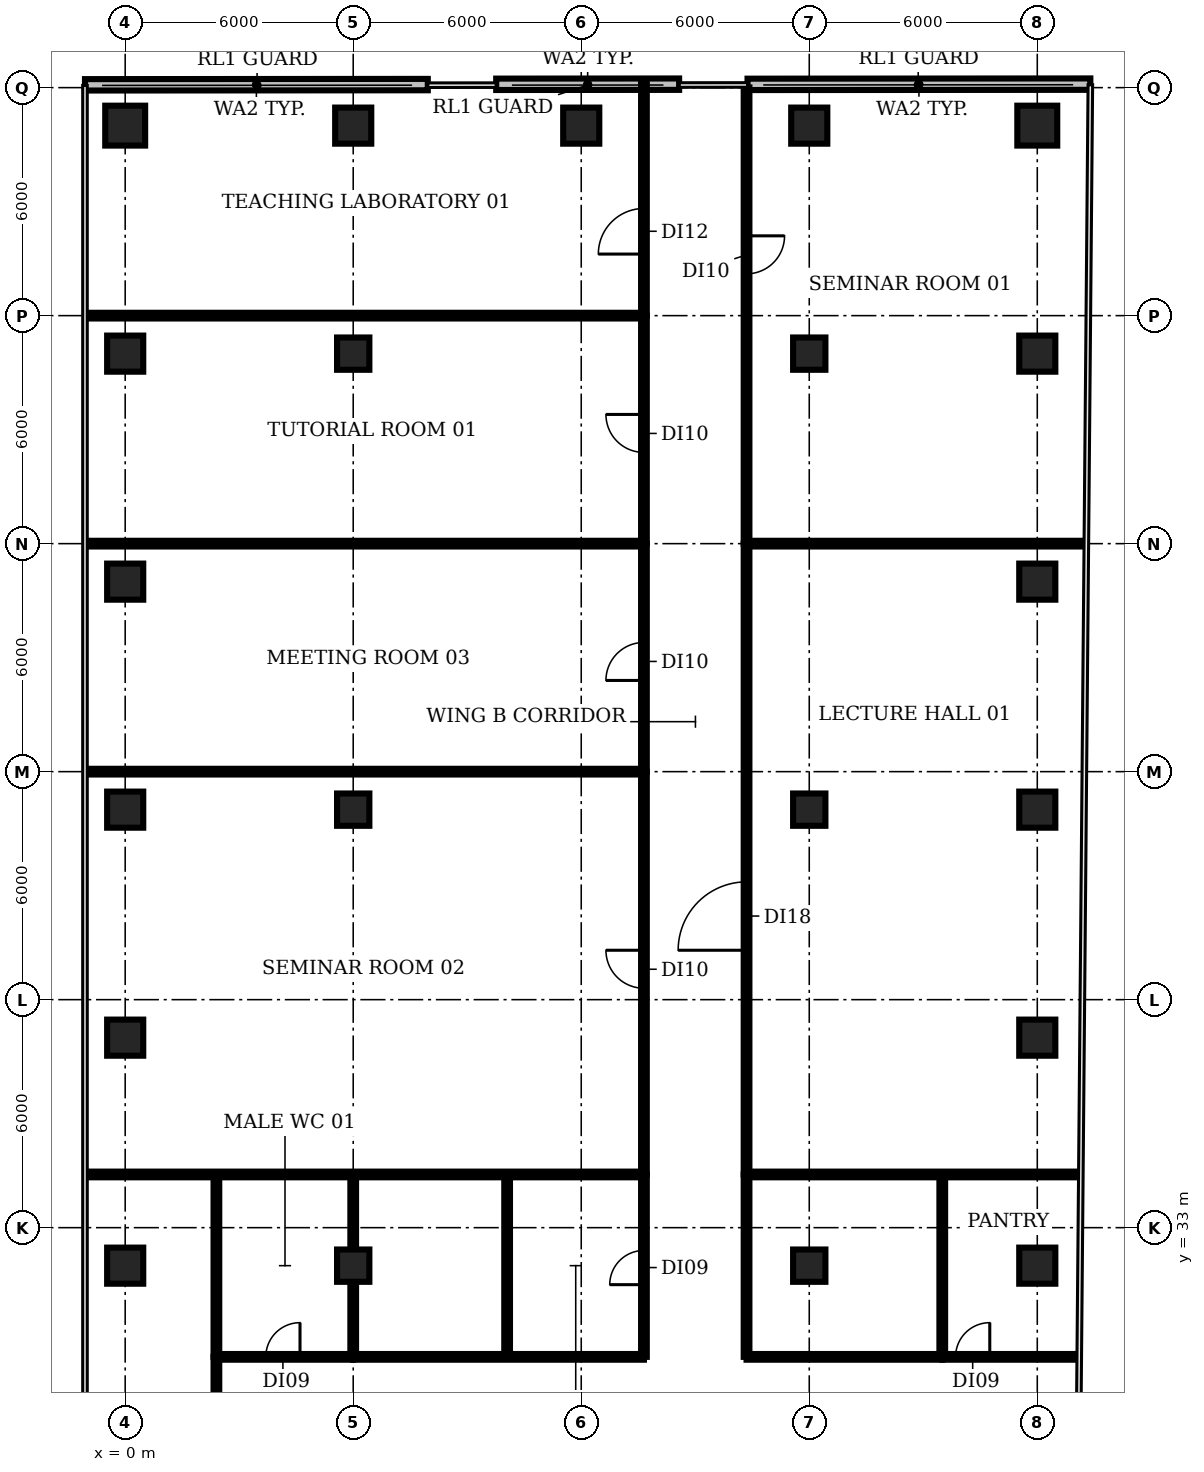
"""IFC4 building model, lengths in metres.
Left out: names, types, materials, properties, quantities, classifications, styles, units other than length and angle.
Written with IfcOpenShell. Run it as: python <this file> out.ifc"""

import sys

from ifc_helpers import new_model, si_unit, direction, frame, frame_2d, origin, origin_2d, place, context, subcontext, project, spatial, rectangle, circle, extrude, element, fill, save


model = new_model("IFC4")
c1 = context("Model", 3, precision=1e-05, world=origin(), true_north=direction((0.0, 1.0)))
c2 = subcontext(c1, "Body", "Model", "MODEL_VIEW")
j1 = project(units=[si_unit("LENGTHUNIT", "METRE"), si_unit("PLANEANGLEUNIT", "RADIAN")], contexts=[c1])
p1 = place(None, origin())
s1 = spatial("IfcSite", under=j1, at=p1, CompositionType="ELEMENT")
p2 = place(p1, origin())
s2 = spatial("IfcBuilding", under=s1, at=p2, CompositionType="ELEMENT")
p3 = place(p2, frame((0.0, 0.0, 50.0)))
s3 = spatial("IfcBuildingStorey", under=s2, at=p3, CompositionType="ELEMENT", Elevation=50.0)
for number, where, z_axis, x_axis in (
    (1, (0.0, 32.0, 0.0), (0.0, 0.0, 1.0), (1.0, 0.0, 0.0)),
    (2, (0.0, 38.0, 0.0), (0.0, 0.0, 1.0), (1.0, 0.0, 0.0)),
    (3, (0.0, 44.0, 0.0), (0.0, 0.0, 1.0), (1.0, 0.0, 0.0)),
    (4, (0.0, 50.0, 0.0), (0.0, 0.0, 1.0), (1.0, 0.0, 0.0)),
    (5, (0.0, 56.0, 0.0), (0.0, 0.0, 1.0), (1.0, 0.0, 0.0)),
):
    element("IfcColumn", number, at=place(p3, frame(where, z_axis=z_axis, x_axis=x_axis)), inside=s3, PredefinedType="COLUMN", context=c2, shape_type="SweptSolid", body=[
        extrude(rectangle(XDim=0.95, YDim=0.95, at=origin_2d()), origin(), (0.0, 0.0, 1.0), 3.85),
    ])
p4 = place(p3, frame((0.0, 62.0, 0.0), z_axis=(0.0, 0.0, 1.0), x_axis=(1.0, 0.0, 0.0)))
e6 = element("IfcColumn", 6, at=p4, inside=s3, PredefinedType="COLUMN", context=c2, shape_type="SweptSolid", body=[
    extrude(circle(Radius=0.525, at=origin_2d()), origin(), (0.0, 0.0, 1.0), 3.85),
])
for number, where, z_axis, x_axis in (
    (7, (6.0, 32.0, 0.0), (0.0, 0.0, 1.0), (1.0, 0.0, 0.0)),
    (8, (6.0, 44.0, 0.0), (0.0, 0.0, 1.0), (1.0, 0.0, 0.0)),
    (9, (6.0, 56.0, 0.0), (0.0, 0.0, 1.0), (1.0, 0.0, 0.0)),
):
    element("IfcColumn", number, at=place(p3, frame(where, z_axis=z_axis, x_axis=x_axis)), inside=s3, PredefinedType="COLUMN", context=c2, shape_type="SweptSolid", body=[
        extrude(rectangle(XDim=0.85, YDim=0.85, at=origin_2d()), origin(), (0.0, 0.0, 1.0), 3.85),
    ])
for number, where, z_axis, x_axis in (
    (10, (6.0, 62.0, 0.0), (0.0, 0.0, 1.0), (1.0, 0.0, 0.0)),
    (11, (12.0, 62.0, 0.0), (0.0, 0.0, 1.0), (1.0, 0.0, 0.0)),
):
    element("IfcColumn", number, at=place(p3, frame(where, z_axis=z_axis, x_axis=x_axis)), inside=s3, PredefinedType="COLUMN", context=c2, shape_type="SweptSolid", body=[
        extrude(rectangle(XDim=0.95, YDim=0.95, at=origin_2d()), origin(), (0.0, 0.0, 1.0), 3.85),
    ])
for number, where, z_axis, x_axis in (
    (12, (18.0, 32.0, 0.0), (0.0, 0.0, 1.0), (1.0, 0.0, 0.0)),
    (13, (18.0, 44.0, 0.0), (0.0, 0.0, 1.0), (1.0, 0.0, 0.0)),
    (14, (18.0, 56.0, 0.0), (0.0, 0.0, 1.0), (1.0, 0.0, 0.0)),
):
    element("IfcColumn", number, at=place(p3, frame(where, z_axis=z_axis, x_axis=x_axis)), inside=s3, PredefinedType="COLUMN", context=c2, shape_type="SweptSolid", body=[
        extrude(rectangle(XDim=0.85, YDim=0.85, at=origin_2d()), origin(), (0.0, 0.0, 1.0), 3.85),
    ])
for number, where, z_axis, x_axis in (
    (15, (18.0, 62.0, 0.0), (0.0, 0.0, 1.0), (1.0, 0.0, 0.0)),
    (16, (24.0, 32.0, 0.0), (0.0, 0.0, 1.0), (1.0, 0.0, 0.0)),
    (17, (24.0, 38.0, 0.0), (0.0, 0.0, 1.0), (1.0, 0.0, 0.0)),
    (18, (24.0, 44.0, 0.0), (0.0, 0.0, 1.0), (1.0, 0.0, 0.0)),
    (19, (24.0, 50.0, 0.0), (0.0, 0.0, 1.0), (1.0, 0.0, 0.0)),
    (20, (24.0, 56.0, 0.0), (0.0, 0.0, 1.0), (1.0, 0.0, 0.0)),
):
    element("IfcColumn", number, at=place(p3, frame(where, z_axis=z_axis, x_axis=x_axis)), inside=s3, PredefinedType="COLUMN", context=c2, shape_type="SweptSolid", body=[
        extrude(rectangle(XDim=0.95, YDim=0.95, at=origin_2d()), origin(), (0.0, 0.0, 1.0), 3.85),
    ])
p5 = place(p3, frame((24.0, 62.0, 0.0), z_axis=(0.0, 0.0, 1.0), x_axis=(1.0, 0.0, 0.0)))
e21 = element("IfcColumn", 21, at=p5, inside=s3, PredefinedType="COLUMN", context=c2, shape_type="SweptSolid", body=[
    extrude(circle(Radius=0.525, at=origin_2d()), origin(), (0.0, 0.0, 1.0), 3.85),
])
p6 = place(p3, frame((25.396, 63.092, 0.0), z_axis=(0.0, 0.0, 1.0), x_axis=(-0.999999752409, -0.000703691501, 0.0)))
e22 = element("IfcWall", 22, at=p6, inside=s3, PredefinedType="SOLIDWALL", context=c2, shape_type="SweptSolid", body=[
    extrude(rectangle(XDim=9.021, YDim=0.3, at=frame_2d((4.51, 0.0))), origin(), (0.0, 0.0, 1.0), 3.85),
])
p7 = place(p3, frame((14.576, 63.091, 0.0), z_axis=(0.0, 0.0, 1.0), x_axis=(-0.999999747891, -0.000710083002, 0.0)))
e23 = element("IfcWall", 23, at=p7, inside=s3, PredefinedType="SOLIDWALL", context=c2, shape_type="SweptSolid", body=[
    extrude(rectangle(XDim=4.813, YDim=0.3, at=frame_2d((2.407, 0.0))), origin(), (0.0, 0.0, 1.0), 3.85),
])
p8 = place(p3, frame((7.962, 63.08, 0.0), z_axis=(0.0, 0.0, 1.0), x_axis=(-0.999999752409, -0.000703691501, 0.0)))
e24 = element("IfcWall", 24, at=p8, inside=s3, PredefinedType="SOLIDWALL", context=c2, shape_type="SweptSolid", body=[
    extrude(rectangle(XDim=9.021, YDim=0.3, at=frame_2d((4.51, 0.0))), origin(), (0.0, 0.0, 1.0), 3.85),
])
for number, where, z_axis, x_axis in (
    (25, (-1.01, 34.4, 0.0), (0.0, 0.0, 1.0), (1.0, 0.0, 0.0)),
    (26, (-1.01, 45.0, 0.0), (0.0, 0.0, 1.0), (1.0, 0.0, 0.0)),
    (27, (-1.01, 51.0, 0.0), (0.0, 0.0, 1.0), (1.0, 0.0, 0.0)),
    (28, (-1.01, 57.0, 0.0), (0.0, 0.0, 1.0), (1.0, 0.0, 0.0)),
):
    element("IfcWall", number, at=place(p3, frame(where, z_axis=z_axis, x_axis=x_axis)), inside=s3, PredefinedType="PARTITIONING", context=c2, shape_type="SweptSolid", body=[
        extrude(rectangle(XDim=14.66, YDim=0.15, at=frame_2d((7.33, 0.0))), origin(), (0.0, 0.0, 1.0), 2.83),
    ])
p9 = place(p3, frame((2.4, 25.7, 0.0), z_axis=(0.0, 0.0, 1.0), x_axis=(0.0, 1.0, 0.0)))
e29 = element("IfcWall", 29, at=p9, inside=s3, PredefinedType="PARTITIONING", context=c2, shape_type="SweptSolid", body=[
    extrude(rectangle(XDim=3.9, YDim=0.15, at=frame_2d((1.95, 0.0))), origin(), (0.0, 0.0, 1.0), 2.83),
])
p10 = place(p3, frame((2.4, 29.6, 0.0), z_axis=(0.0, 0.0, 1.0), x_axis=(0.0, 1.0, 0.0)))
e30 = element("IfcWall", 30, at=p10, inside=s3, PredefinedType="PARTITIONING", context=c2, shape_type="SweptSolid", body=[
    extrude(rectangle(XDim=4.8, YDim=0.15, at=frame_2d((2.4, 0.0))), origin(), (0.0, 0.0, 1.0), 2.83),
])
p11 = place(p3, frame((2.4, 29.6, 0.0), z_axis=(0.0, 0.0, 1.0), x_axis=(1.0, 0.0, 0.0)))
e31 = element("IfcWall", 31, at=p11, inside=s3, PredefinedType="PARTITIONING", context=c2, shape_type="SweptSolid", body=[
    extrude(rectangle(XDim=3.6, YDim=0.15, at=frame_2d((1.8, 0.0))), origin(), (0.0, 0.0, 1.0), 2.83),
])
p12 = place(p11, frame((1.3, 0.0, 0.0)))
e32 = element("IfcOpeningElement", 32, at=p12, cuts=e31, PredefinedType="OPENING", context=c2, shape_type="SweptSolid", body=[
    extrude(rectangle(XDim=0.9, YDim=2.1, at=frame_2d((0.45, 1.05))), frame((0.0, 0.085, 0.0), z_axis=(0.0, -1.0, 0.0), x_axis=(1.0, 0.0, 0.0)), (0.0, 0.0, 1.0), 0.17),
])
p13 = place(p3, frame((6.0, 29.6, 0.0), z_axis=(0.0, 0.0, 1.0), x_axis=(0.0, 1.0, 0.0)))
e33 = element("IfcWall", 33, at=p13, inside=s3, PredefinedType="PARTITIONING", context=c2, shape_type="SweptSolid", body=[
    extrude(rectangle(XDim=4.8, YDim=0.15, at=frame_2d((2.4, 0.0))), origin(), (0.0, 0.0, 1.0), 2.83),
])
p14 = place(p3, frame((6.0, 29.6, 0.0), z_axis=(0.0, 0.0, 1.0), x_axis=(1.0, 0.0, 0.0)))
e34 = element("IfcWall", 34, at=p14, inside=s3, PredefinedType="PARTITIONING", context=c2, shape_type="SweptSolid", body=[
    extrude(rectangle(XDim=7.65, YDim=0.15, at=frame_2d((3.825, 0.0))), origin(), (0.0, 0.0, 1.0), 2.83),
])
p15 = place(p3, frame((10.05, 29.6, 0.0), z_axis=(0.0, 0.0, 1.0), x_axis=(0.0, 1.0, 0.0)))
e35 = element("IfcWall", 35, at=p15, inside=s3, PredefinedType="PARTITIONING", context=c2, shape_type="SweptSolid", body=[
    extrude(rectangle(XDim=4.8, YDim=0.15, at=frame_2d((2.4, 0.0))), origin(), (0.0, 0.0, 1.0), 2.83),
])
p16 = place(p3, frame((13.65, 29.6, 0.0), z_axis=(0.0, 0.0, 1.0), x_axis=(0.0, 1.0, 0.0)))
e36 = element("IfcWall", 36, at=p16, inside=s3, PredefinedType="PARTITIONING", context=c2, shape_type="SweptSolid", body=[
    extrude(rectangle(XDim=4.8, YDim=0.15, at=frame_2d((2.4, 0.0))), origin(), (0.0, 0.0, 1.0), 2.83),
])
p17 = place(p16, frame((1.9, 0.0, 0.0)))
e37 = element("IfcOpeningElement", 37, at=p17, cuts=e36, PredefinedType="OPENING", context=c2, shape_type="SweptSolid", body=[
    extrude(rectangle(XDim=0.9, YDim=2.1, at=frame_2d((0.45, 1.05))), frame((0.0, 0.085, 0.0), z_axis=(0.0, -1.0, 0.0), x_axis=(1.0, 0.0, 0.0)), (0.0, 0.0, 1.0), 0.17),
])
p18 = place(p3, frame((13.65, 34.4, 0.0), z_axis=(0.0, 0.0, 1.0), x_axis=(0.0, 1.0, 0.0)))
e38 = element("IfcWall", 38, at=p18, inside=s3, PredefinedType="PARTITIONING", context=c2, shape_type="SweptSolid", body=[
    extrude(rectangle(XDim=10.6, YDim=0.15, at=frame_2d((5.3, 0.0))), origin(), (0.0, 0.0, 1.0), 2.83),
])
p19 = place(p18, frame((4.9, 0.0, 0.0)))
e39 = element("IfcOpeningElement", 39, at=p19, cuts=e38, PredefinedType="OPENING", context=c2, shape_type="SweptSolid", body=[
    extrude(rectangle(XDim=1.0, YDim=2.1, at=frame_2d((0.5, 1.05))), frame((0.0, 0.085, 0.0), z_axis=(0.0, -1.0, 0.0), x_axis=(1.0, 0.0, 0.0)), (0.0, 0.0, 1.0), 0.17),
])
p20 = place(p3, frame((13.65, 45.0, 0.0), z_axis=(0.0, 0.0, 1.0), x_axis=(0.0, 1.0, 0.0)))
e40 = element("IfcWall", 40, at=p20, inside=s3, PredefinedType="PARTITIONING", context=c2, shape_type="SweptSolid", body=[
    extrude(rectangle(XDim=6.0, YDim=0.15, at=frame_2d((3.0, 0.0))), origin(), (0.0, 0.0, 1.0), 2.83),
])
p21 = place(p20, frame((2.4, 0.0, 0.0)))
e41 = element("IfcOpeningElement", 41, at=p21, cuts=e40, PredefinedType="OPENING", context=c2, shape_type="SweptSolid", body=[
    extrude(rectangle(XDim=1.0, YDim=2.1, at=frame_2d((0.5, 1.05))), frame((0.0, 0.085, 0.0), z_axis=(0.0, -1.0, 0.0), x_axis=(1.0, 0.0, 0.0)), (0.0, 0.0, 1.0), 0.17),
])
p22 = place(p3, frame((13.65, 51.0, 0.0), z_axis=(0.0, 0.0, 1.0), x_axis=(0.0, 1.0, 0.0)))
e42 = element("IfcWall", 42, at=p22, inside=s3, PredefinedType="PARTITIONING", context=c2, shape_type="SweptSolid", body=[
    extrude(rectangle(XDim=6.0, YDim=0.15, at=frame_2d((3.0, 0.0))), origin(), (0.0, 0.0, 1.0), 2.83),
])
p23 = place(p22, frame((2.4, 0.0, 0.0)))
e43 = element("IfcOpeningElement", 43, at=p23, cuts=e42, PredefinedType="OPENING", context=c2, shape_type="SweptSolid", body=[
    extrude(rectangle(XDim=1.0, YDim=2.1, at=frame_2d((0.5, 1.05))), frame((0.0, 0.085, 0.0), z_axis=(0.0, -1.0, 0.0), x_axis=(1.0, 0.0, 0.0)), (0.0, 0.0, 1.0), 0.17),
])
p24 = place(p3, frame((13.65, 57.0, 0.0), z_axis=(0.0, 0.0, 1.0), x_axis=(0.0, 1.0, 0.0)))
e44 = element("IfcWall", 44, at=p24, inside=s3, PredefinedType="PARTITIONING", context=c2, shape_type="SweptSolid", body=[
    extrude(rectangle(XDim=6.128, YDim=0.15, at=frame_2d((3.064, 0.0))), origin(), (0.0, 0.0, 1.0), 2.83),
])
p25 = place(p24, frame((1.62, 0.0, 0.0)))
e45 = element("IfcOpeningElement", 45, at=p25, cuts=e44, PredefinedType="OPENING", context=c2, shape_type="SweptSolid", body=[
    extrude(rectangle(XDim=1.2, YDim=2.1, at=frame_2d((0.6, 1.05))), frame((0.0, 0.085, 0.0), z_axis=(0.0, -1.0, 0.0), x_axis=(1.0, 0.0, 0.0)), (0.0, 0.0, 1.0), 0.17),
])
p26 = place(p3, frame((16.35, 29.6, 0.0), z_axis=(0.0, 0.0, 1.0), x_axis=(0.0, 1.0, 0.0)))
e46 = element("IfcWall", 46, at=p26, inside=s3, PredefinedType="PARTITIONING", context=c2, shape_type="SweptSolid", body=[
    extrude(rectangle(XDim=4.8, YDim=0.15, at=frame_2d((2.4, 0.0))), origin(), (0.0, 0.0, 1.0), 2.83),
])
p27 = place(p3, frame((16.35, 29.6, 0.0), z_axis=(0.0, 0.0, 1.0), x_axis=(1.0, 0.0, 0.0)))
e47 = element("IfcWall", 47, at=p27, inside=s3, PredefinedType="PARTITIONING", context=c2, shape_type="SweptSolid", body=[
    extrude(rectangle(XDim=5.15, YDim=0.15, at=frame_2d((2.575, 0.0))), origin(), (0.0, 0.0, 1.0), 2.83),
])
p28 = place(p3, frame((16.35, 34.4, 0.0), z_axis=(0.0, 0.0, 1.0), x_axis=(0.0, 1.0, 0.0)))
e48 = element("IfcWall", 48, at=p28, inside=s3, PredefinedType="PARTITIONING", context=c2, shape_type="SweptSolid", body=[
    extrude(rectangle(XDim=16.6, YDim=0.15, at=frame_2d((8.3, 0.0))), origin(), (0.0, 0.0, 1.0), 2.83),
])
p29 = place(p28, frame((5.9, 0.0, 0.0)))
e49 = element("IfcOpeningElement", 49, at=p29, cuts=e48, PredefinedType="OPENING", context=c2, shape_type="SweptSolid", body=[
    extrude(rectangle(XDim=1.8, YDim=2.1, at=frame_2d((0.9, 1.05))), frame((0.0, 0.085, 0.0), z_axis=(0.0, -1.0, 0.0), x_axis=(1.0, 0.0, 0.0)), (0.0, 0.0, 1.0), 0.17),
])
p30 = place(p3, frame((16.35, 34.4, 0.0), z_axis=(0.0, 0.0, 1.0), x_axis=(1.0, 0.0, 0.0)))
e50 = element("IfcWall", 50, at=p30, inside=s3, PredefinedType="PARTITIONING", context=c2, shape_type="SweptSolid", body=[
    extrude(rectangle(XDim=8.75, YDim=0.15, at=frame_2d((4.375, 0.0))), origin(), (0.0, 0.0, 1.0), 2.83),
])
p31 = place(p3, frame((16.35, 51.0, 0.0), z_axis=(0.0, 0.0, 1.0), x_axis=(1.0, 0.0, 0.0)))
e51 = element("IfcWall", 51, at=p31, inside=s3, PredefinedType="PARTITIONING", context=c2, shape_type="SweptSolid", body=[
    extrude(rectangle(XDim=8.875, YDim=0.15, at=frame_2d((4.438, 0.0))), origin(), (0.0, 0.0, 1.0), 2.83),
])
p32 = place(p3, frame((16.35, 63.005, 0.0), z_axis=(0.0, 0.0, 1.0), x_axis=(0.0, -1.0, 0.0)))
e52 = element("IfcWall", 52, at=p32, inside=s3, PredefinedType="PARTITIONING", context=c2, shape_type="SweptSolid", body=[
    extrude(rectangle(XDim=12.005, YDim=0.15, at=frame_2d((6.002, 0.0))), origin(), (0.0, 0.0, 1.0), 2.83),
])
p33 = place(p32, frame((3.905, 0.0, 0.0)))
e53 = element("IfcOpeningElement", 53, at=p33, cuts=e52, PredefinedType="OPENING", context=c2, shape_type="SweptSolid", body=[
    extrude(rectangle(XDim=1.0, YDim=2.1, at=frame_2d((0.5, 1.05))), frame((0.0, 0.085, 0.0), z_axis=(0.0, -1.0, 0.0), x_axis=(1.0, 0.0, 0.0)), (0.0, 0.0, 1.0), 0.17),
])
p34 = place(p3, frame((21.5, 29.6, 0.0), z_axis=(0.0, 0.0, 1.0), x_axis=(0.0, 1.0, 0.0)))
e54 = element("IfcWall", 54, at=p34, inside=s3, PredefinedType="PARTITIONING", context=c2, shape_type="SweptSolid", body=[
    extrude(rectangle(XDim=4.8, YDim=0.15, at=frame_2d((2.4, 0.0))), origin(), (0.0, 0.0, 1.0), 2.83),
])
p35 = place(p3, frame((21.5, 29.6, 0.0), z_axis=(0.0, 0.0, 1.0), x_axis=(1.0, 0.0, 0.0)))
e55 = element("IfcWall", 55, at=p35, inside=s3, PredefinedType="PARTITIONING", context=c2, shape_type="SweptSolid", body=[
    extrude(rectangle(XDim=3.55, YDim=0.15, at=frame_2d((1.775, 0.0))), origin(), (0.0, 0.0, 1.0), 2.83),
])
p36 = place(p35, frame((0.35, 0.0, 0.0)))
e56 = element("IfcOpeningElement", 56, at=p36, cuts=e55, PredefinedType="OPENING", context=c2, shape_type="SweptSolid", body=[
    extrude(rectangle(XDim=0.9, YDim=2.1, at=frame_2d((0.45, 1.05))), frame((0.0, 0.085, 0.0), z_axis=(0.0, -1.0, 0.0), x_axis=(1.0, 0.0, 0.0)), (0.0, 0.0, 1.0), 0.17),
])
p37 = place(p12, origin())
e57 = element("IfcDoor", 57, at=p37, inside=s3, OperationType="SINGLE_SWING_RIGHT", PredefinedType="DOOR", context=c2, shape_type="SweptSolid", body=[
    extrude(rectangle(XDim=0.9, YDim=2.1, at=frame_2d((0.45, 1.05))), frame((0.0, 0.025, 0.0), z_axis=(0.0, -1.0, 0.0), x_axis=(1.0, 0.0, 0.0)), (0.0, 0.0, 1.0), 0.05),
])
fill(e32, e57)
p38 = place(p17, origin())
e58 = element("IfcDoor", 58, at=p38, inside=s3, OperationType="SINGLE_SWING_LEFT", PredefinedType="DOOR", context=c2, shape_type="SweptSolid", body=[
    extrude(rectangle(XDim=0.9, YDim=2.1, at=frame_2d((0.45, 1.05))), frame((0.0, 0.025, 0.0), z_axis=(0.0, -1.0, 0.0), x_axis=(1.0, 0.0, 0.0)), (0.0, 0.0, 1.0), 0.05),
])
fill(e37, e58)
p39 = place(p19, origin())
e59 = element("IfcDoor", 59, at=p39, inside=s3, OperationType="SINGLE_SWING_RIGHT", PredefinedType="DOOR", context=c2, shape_type="SweptSolid", body=[
    extrude(rectangle(XDim=1.0, YDim=2.1, at=frame_2d((0.5, 1.05))), frame((0.0, 0.025, 0.0), z_axis=(0.0, -1.0, 0.0), x_axis=(1.0, 0.0, 0.0)), (0.0, 0.0, 1.0), 0.05),
])
fill(e39, e59)
p40 = place(p21, origin())
e60 = element("IfcDoor", 60, at=p40, inside=s3, OperationType="SINGLE_SWING_LEFT", PredefinedType="DOOR", context=c2, shape_type="SweptSolid", body=[
    extrude(rectangle(XDim=1.0, YDim=2.1, at=frame_2d((0.5, 1.05))), frame((0.0, 0.025, 0.0), z_axis=(0.0, -1.0, 0.0), x_axis=(1.0, 0.0, 0.0)), (0.0, 0.0, 1.0), 0.05),
])
fill(e41, e60)
p41 = place(p23, origin())
e61 = element("IfcDoor", 61, at=p41, inside=s3, OperationType="SINGLE_SWING_RIGHT", PredefinedType="DOOR", context=c2, shape_type="SweptSolid", body=[
    extrude(rectangle(XDim=1.0, YDim=2.1, at=frame_2d((0.5, 1.05))), frame((0.0, 0.025, 0.0), z_axis=(0.0, -1.0, 0.0), x_axis=(1.0, 0.0, 0.0)), (0.0, 0.0, 1.0), 0.05),
])
fill(e43, e61)
p42 = place(p25, origin())
e62 = element("IfcDoor", 62, at=p42, inside=s3, OperationType="SINGLE_SWING_LEFT", PredefinedType="DOOR", context=c2, shape_type="SweptSolid", body=[
    extrude(rectangle(XDim=1.2, YDim=2.1, at=frame_2d((0.6, 1.05))), frame((0.0, 0.025, 0.0), z_axis=(0.0, -1.0, 0.0), x_axis=(1.0, 0.0, 0.0)), (0.0, 0.0, 1.0), 0.05),
])
fill(e45, e62)
p43 = place(p29, origin())
e63 = element("IfcDoor", 63, at=p43, inside=s3, OperationType="SINGLE_SWING_LEFT", PredefinedType="DOOR", context=c2, shape_type="SweptSolid", body=[
    extrude(rectangle(XDim=1.8, YDim=2.1, at=frame_2d((0.9, 1.05))), frame((0.0, 0.025, 0.0), z_axis=(0.0, -1.0, 0.0), x_axis=(1.0, 0.0, 0.0)), (0.0, 0.0, 1.0), 0.05),
])
fill(e49, e63)
p44 = place(p33, origin())
e64 = element("IfcDoor", 64, at=p44, inside=s3, OperationType="SINGLE_SWING_LEFT", PredefinedType="DOOR", context=c2, shape_type="SweptSolid", body=[
    extrude(rectangle(XDim=1.0, YDim=2.1, at=frame_2d((0.5, 1.05))), frame((0.0, 0.025, 0.0), z_axis=(0.0, -1.0, 0.0), x_axis=(1.0, 0.0, 0.0)), (0.0, 0.0, 1.0), 0.05),
])
fill(e53, e64)
p45 = place(p36, origin())
e65 = element("IfcDoor", 65, at=p45, inside=s3, OperationType="SINGLE_SWING_RIGHT", PredefinedType="DOOR", context=c2, shape_type="SweptSolid", body=[
    extrude(rectangle(XDim=0.9, YDim=2.1, at=frame_2d((0.45, 1.05))), frame((0.0, 0.025, 0.0), z_axis=(0.0, -1.0, 0.0), x_axis=(1.0, 0.0, 0.0)), (0.0, 0.0, 1.0), 0.05),
])
fill(e56, e65)
save(model, sys.argv[1])
